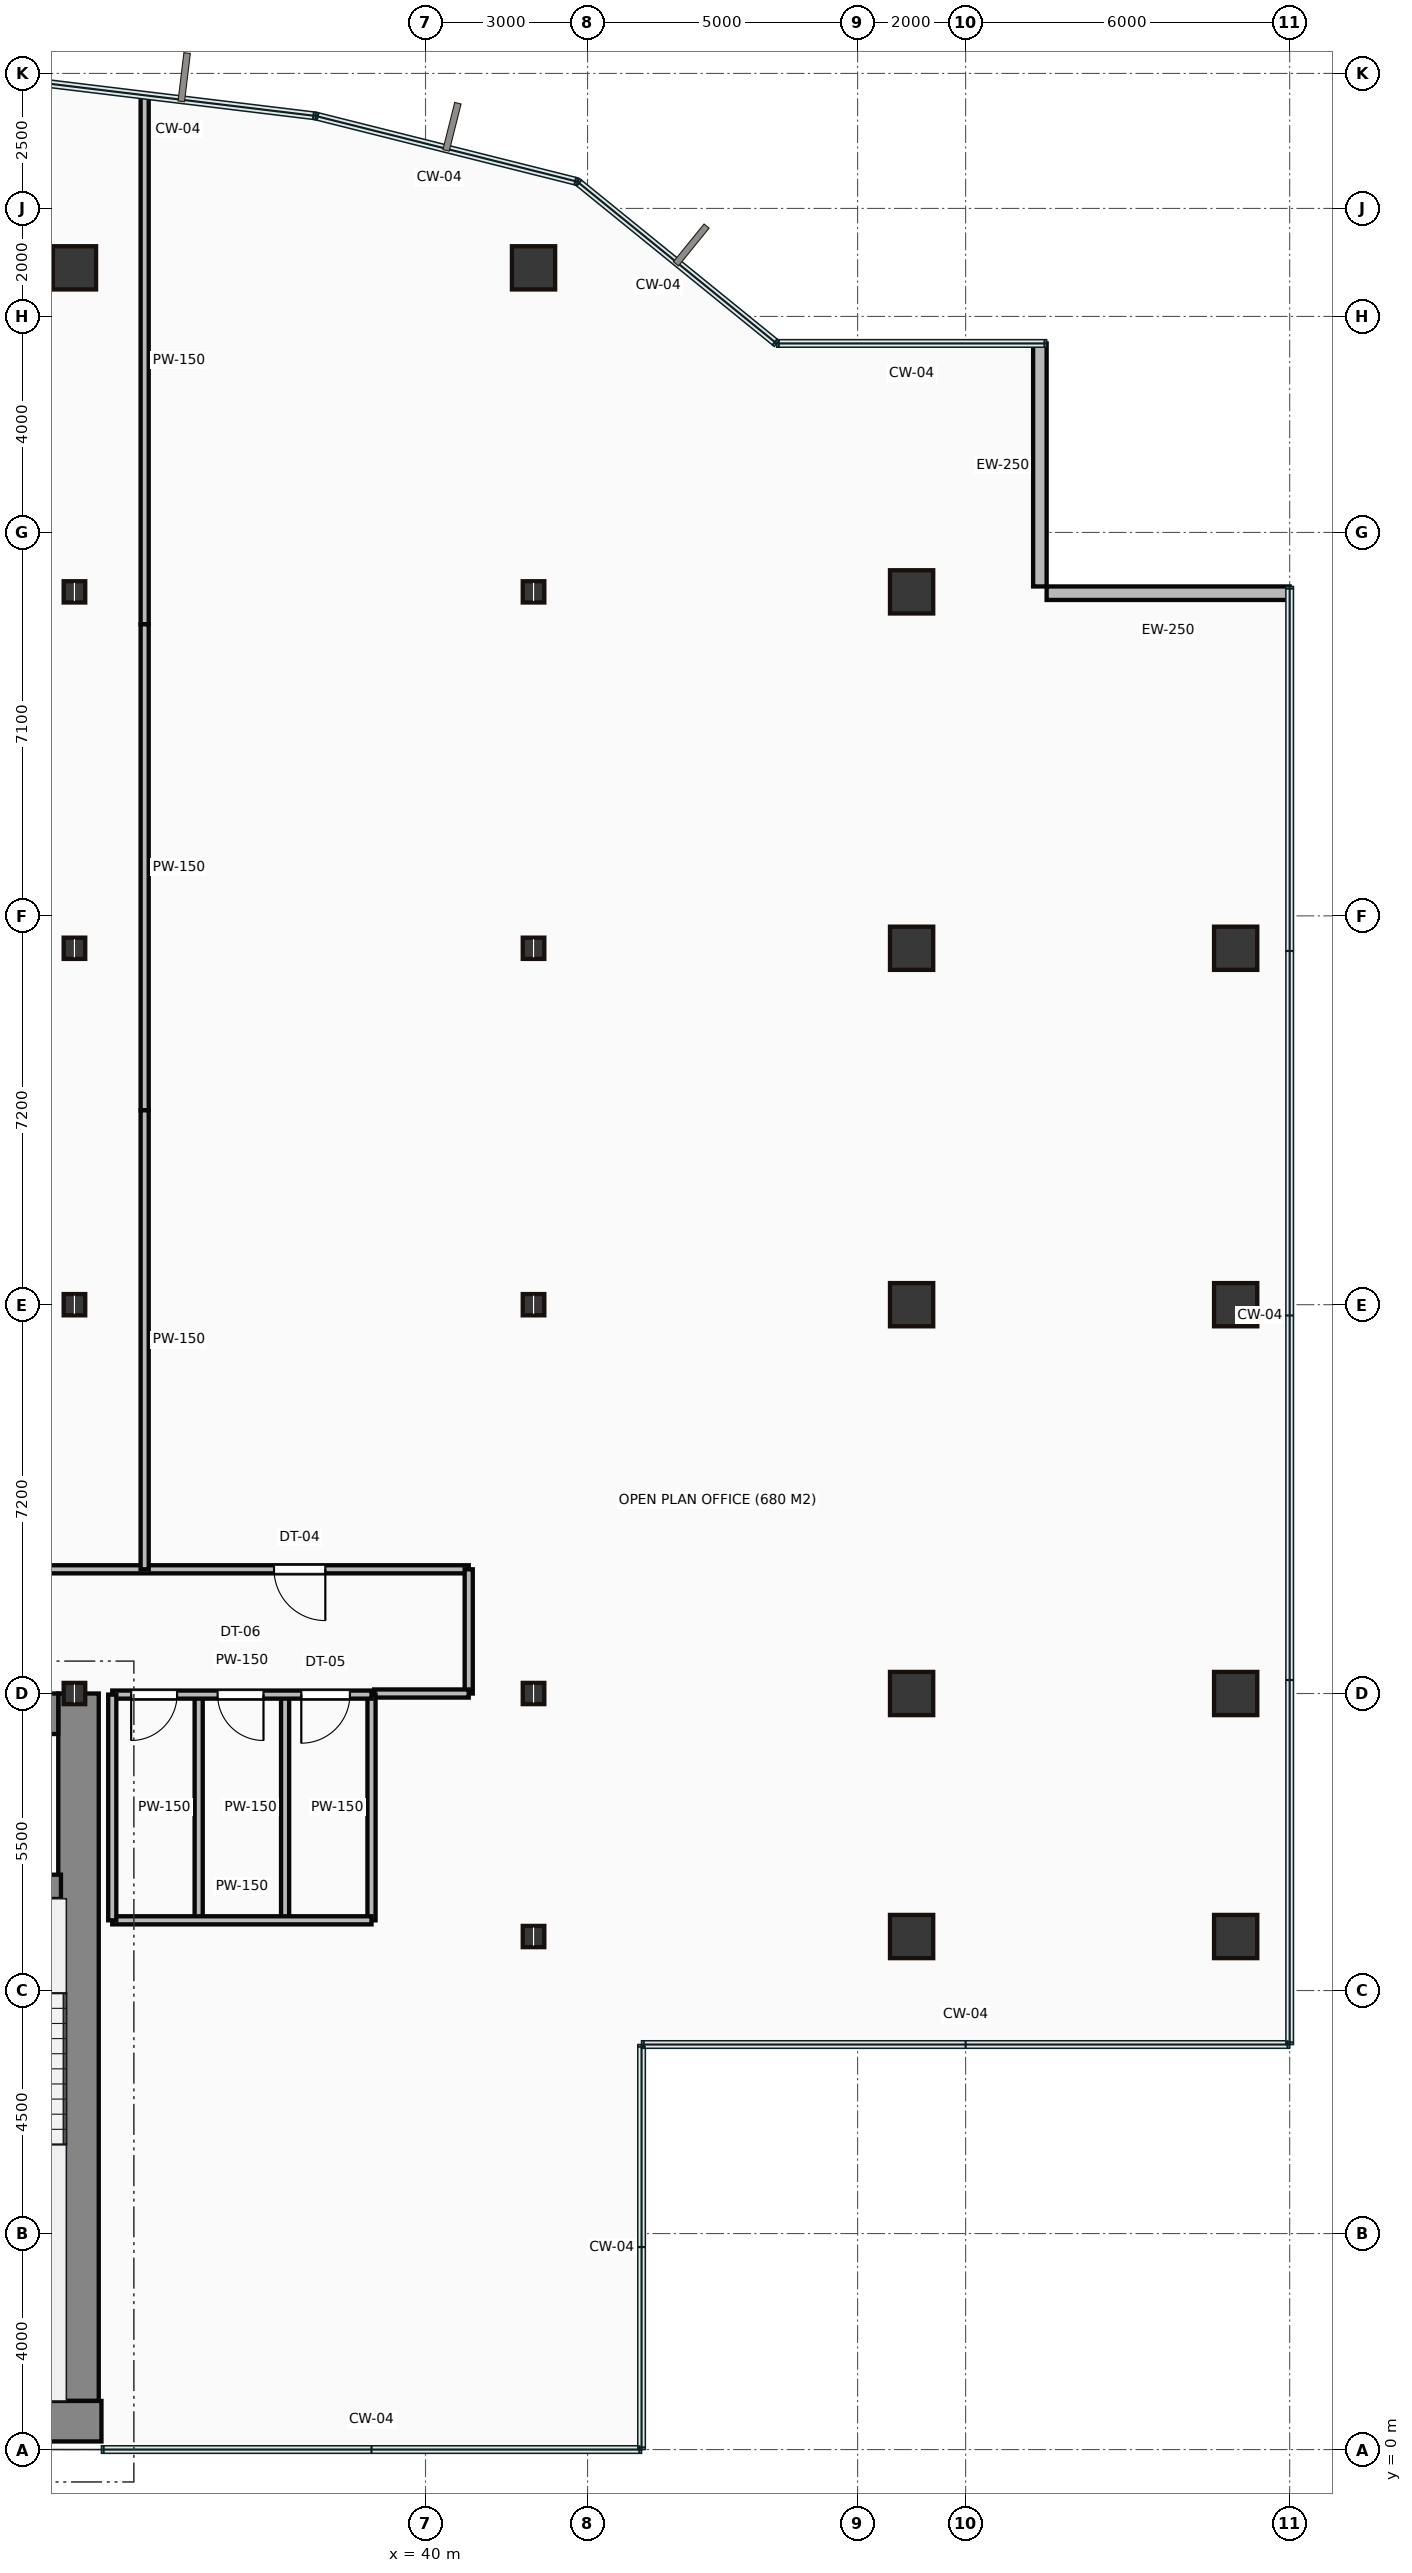
"""IFC4 building model, lengths in metres.
Left out: names, types, materials, properties, quantities, classifications, styles, units other than length and angle.
Written with IfcOpenShell. Run it as: python <this file> out.ifc"""

import sys

from ifc_helpers import new_model, si_unit, direction, frame, frame_2d, origin, origin_2d, place, context, subcontext, project, spatial, rectangle, hollow_rectangle, i_section, extrude, source, transform, mapped, element, fill, save


model = new_model("IFC4")
c1 = context("Model", 3, precision=1e-05, world=origin(), true_north=direction((0.0, 1.0)))
c2 = subcontext(c1, "Body", "Model", "MODEL_VIEW")
j1 = project(units=[si_unit("LENGTHUNIT", "METRE"), si_unit("PLANEANGLEUNIT", "RADIAN")], contexts=[c1])
p1 = place(None, origin())
s1 = spatial("IfcSite", under=j1, at=p1, CompositionType="ELEMENT")
p2 = place(p1, origin())
s2 = spatial("IfcBuilding", under=s1, at=p2, CompositionType="ELEMENT")
p3 = place(p2, frame((0.0, 0.0, 125.15)))
s3 = spatial("IfcBuildingStorey", under=s2, at=p3, CompositionType="ELEMENT", Elevation=125.15)
m1 = source(origin(), c2, "Body", "SweptSolid", [
    extrude(rectangle(XDim=29.5, YDim=0.75, at=frame_2d((14.75, 0.0))), origin(), (0.0, 0.0, 1.0), 3.65),
])
p4 = place(p3, frame((4.5, 0.525, 0.0), z_axis=(0.0, 0.0, 1.0), x_axis=(1.0, 0.0, 0.0)))
e1 = element("IfcWall", 1, at=p4, inside=s3, PredefinedType="SHEAR", context=c2, shape_type="MappedRepresentation", body=[
    mapped(m1, transform((0.0, 0.0, 0.0))),
])
m2 = source(origin(), c2, "Body", "SweptSolid", [
    extrude(rectangle(XDim=13.1, YDim=0.75, at=frame_2d((6.55, 0.0))), origin(), (0.0, 0.0, 1.0), 3.65),
])
p5 = place(p3, frame((33.575, 0.9, 0.0), z_axis=(0.0, 0.0, 1.0), x_axis=(0.0, 1.0, 0.0)))
e2 = element("IfcWall", 2, at=p5, inside=s3, PredefinedType="SHEAR", context=c2, shape_type="MappedRepresentation", body=[
    mapped(m2, transform((0.0, 0.0, 0.0))),
])
m3 = source(origin(), c2, "Body", "SweptSolid", [
    extrude(rectangle(XDim=12.6, YDim=0.75, at=frame_2d((6.3, 0.0))), origin(), (0.0, 0.0, 1.0), 3.65),
])
p6 = place(p3, frame((20.6, 13.625, 0.0), z_axis=(0.0, 0.0, 1.0), x_axis=(1.0, 0.0, 0.0)))
e3 = element("IfcWall", 3, at=p6, inside=s3, PredefinedType="SHEAR", context=c2, shape_type="MappedRepresentation", body=[
    mapped(m3, transform((0.0, 0.0, 0.0))),
])
p7 = place(p6, frame((9.25, 0.0, 0.0)))
e4 = element("IfcOpeningElement", 4, at=p7, cuts=e3, PredefinedType="OPENING", context=c2, shape_type="SweptSolid", body=[
    extrude(rectangle(XDim=1.1, YDim=2.15, at=frame_2d((0.55, 1.075))), frame((0.0, 0.385, 0.0), z_axis=(0.0, -1.0, 0.0), x_axis=(1.0, 0.0, 0.0)), (0.0, 0.0, 1.0), 0.77),
])
m4 = source(origin(), c2, "Body", "SweptSolid", [
    extrude(rectangle(XDim=3.39, YDim=0.45, at=frame_2d((1.695, 0.0))), origin(), (0.0, 0.0, 1.0), 3.65),
])
p8 = place(p3, frame((29.86, 10.42, 0.0), z_axis=(0.0, 0.0, 1.0), x_axis=(1.0, 0.0, 0.0)))
e5 = element("IfcWall", 5, at=p8, inside=s3, PredefinedType="SHEAR", context=c2, shape_type="MappedRepresentation", body=[
    mapped(m4, transform((0.0, 0.0, 0.0))),
])
p9 = place(p8, frame((1.1, 0.0, 0.0)))
e6 = element("IfcOpeningElement", 6, at=p9, cuts=e5, PredefinedType="OPENING", context=c2, shape_type="SweptSolid", body=[
    extrude(rectangle(XDim=1.1, YDim=2.15, at=frame_2d((0.55, 1.075))), frame((0.0, 0.235, 0.0), z_axis=(0.0, -1.0, 0.0), x_axis=(1.0, 0.0, 0.0)), (0.0, 0.0, 1.0), 0.47),
])
m5 = source(origin(), c2, "Body", "SweptSolid", [
    extrude(i_section(OverallWidth=0.399, OverallDepth=0.393, WebThickness=0.023, FlangeThickness=0.037, at=origin_2d()), origin(), (0.0, 0.0, 1.0), 3.65),
])
for number, where, z_axis, x_axis in (
    (7, (33.5, 14.0, 0.0), (0.0, 0.0, 1.0), (1.0, 0.0, 0.0)),
    (8, (33.5, 21.2, 0.0), (0.0, 0.0, 1.0), (1.0, 0.0, 0.0)),
    (9, (33.5, 27.8, 0.0), (0.0, 0.0, 1.0), (1.0, 0.0, 0.0)),
    (10, (33.5, 34.4, 0.0), (0.0, 0.0, 1.0), (1.0, 0.0, 0.0)),
):
    element("IfcColumn", number, at=place(p3, frame(where, z_axis=z_axis, x_axis=x_axis)), inside=s3, PredefinedType="COLUMN", context=c2, shape_type="MappedRepresentation", body=[
        mapped(m5, transform((0.0, 0.0, 0.0))),
    ])
m6 = source(origin(), c2, "Body", "SweptSolid", [
    extrude(hollow_rectangle(XDim=0.8, YDim=0.8, WallThickness=0.04, at=origin_2d()), origin(), (0.0, 0.0, 1.0), 3.65),
])
p10 = place(p3, frame((33.5, 40.4, 0.0), z_axis=(0.0, 0.0, 1.0), x_axis=(1.0, 0.0, 0.0)))
e11 = element("IfcColumn", 11, at=p10, inside=s3, PredefinedType="COLUMN", context=c2, shape_type="MappedRepresentation", body=[
    mapped(m6, transform((0.0, 0.0, 0.0))),
])
for number, where, z_axis, x_axis in (
    (12, (42.0, 9.5, 0.0), (0.0, 0.0, 1.0), (1.0, 0.0, 0.0)),
    (13, (42.0, 14.0, 0.0), (0.0, 0.0, 1.0), (1.0, 0.0, 0.0)),
    (14, (42.0, 21.2, 0.0), (0.0, 0.0, 1.0), (1.0, 0.0, 0.0)),
    (15, (42.0, 27.8, 0.0), (0.0, 0.0, 1.0), (1.0, 0.0, 0.0)),
    (16, (42.0, 34.4, 0.0), (0.0, 0.0, 1.0), (1.0, 0.0, 0.0)),
):
    element("IfcColumn", number, at=place(p3, frame(where, z_axis=z_axis, x_axis=x_axis)), inside=s3, PredefinedType="COLUMN", context=c2, shape_type="MappedRepresentation", body=[
        mapped(m5, transform((0.0, 0.0, 0.0))),
    ])
for number, where, z_axis, x_axis in (
    (17, (42.0, 40.4, 0.0), (0.0, 0.0, 1.0), (1.0, 0.0, 0.0)),
    (18, (49.0, 9.5, 0.0), (0.0, 0.0, 1.0), (1.0, 0.0, 0.0)),
    (19, (49.0, 14.0, 0.0), (0.0, 0.0, 1.0), (1.0, 0.0, 0.0)),
    (20, (49.0, 21.2, 0.0), (0.0, 0.0, 1.0), (1.0, 0.0, 0.0)),
    (21, (49.0, 27.8, 0.0), (0.0, 0.0, 1.0), (1.0, 0.0, 0.0)),
    (22, (49.0, 34.4, 0.0), (0.0, 0.0, 1.0), (1.0, 0.0, 0.0)),
    (23, (55.0, 9.5, 0.0), (0.0, 0.0, 1.0), (1.0, 0.0, 0.0)),
    (24, (55.0, 14.0, 0.0), (0.0, 0.0, 1.0), (1.0, 0.0, 0.0)),
    (25, (55.0, 21.2, 0.0), (0.0, 0.0, 1.0), (1.0, 0.0, 0.0)),
    (26, (55.0, 27.8, 0.0), (0.0, 0.0, 1.0), (1.0, 0.0, 0.0)),
):
    element("IfcColumn", number, at=place(p3, frame(where, z_axis=z_axis, x_axis=x_axis)), inside=s3, PredefinedType="COLUMN", context=c2, shape_type="MappedRepresentation", body=[
        mapped(m6, transform((0.0, 0.0, 0.0))),
    ])
m7 = source(origin(), c2, "Body", "SweptSolid", [
    extrude(rectangle(XDim=4.5, YDim=0.25, at=frame_2d((2.25, 0.0))), origin(), (0.0, 0.0, 1.0), 3.4),
])
for number, where, z_axis, x_axis in (
    (27, (56.0, 34.375, 0.0), (0.0, 0.0, 1.0), (-1.0, 0.0, 0.0)),
    (28, (51.375, 34.5, 0.0), (0.0, 0.0, 1.0), (0.0, 1.0, 0.0)),
):
    element("IfcWall", number, at=place(p3, frame(where, z_axis=z_axis, x_axis=x_axis)), inside=s3, PredefinedType="STANDARD", context=c2, shape_type="MappedRepresentation", body=[
        mapped(m7, transform((0.0, 0.0, 0.0))),
    ])
m8 = source(origin(), c2, "Body", "SweptSolid", [
    extrude(rectangle(XDim=4.8, YDim=0.15, at=frame_2d((2.4, 0.0))), origin(), (0.0, 0.0, 1.0), 2.702),
])
p11 = place(p3, frame((34.2, 13.98, 0.0), z_axis=(0.0, 0.0, 1.0), x_axis=(1.0, 0.0, 0.0)))
e29 = element("IfcWall", 29, at=p11, inside=s3, PredefinedType="PARTITIONING", context=c2, shape_type="MappedRepresentation", body=[
    mapped(m8, transform((0.0, 0.0, 0.0))),
])
p12 = place(p11, frame((0.35, 0.0, 0.0)))
e30 = element("IfcOpeningElement", 30, at=p12, cuts=e29, PredefinedType="OPENING", context=c2, shape_type="SweptSolid", body=[
    extrude(rectangle(XDim=0.85, YDim=2.1, at=frame_2d((0.425, 1.05))), frame((0.0, 0.085, 0.0), z_axis=(0.0, -1.0, 0.0), x_axis=(1.0, 0.0, 0.0)), (0.0, 0.0, 1.0), 0.17),
])
p13 = place(p11, frame((1.95, 0.0, 0.0)))
e31 = element("IfcOpeningElement", 31, at=p13, cuts=e29, PredefinedType="OPENING", context=c2, shape_type="SweptSolid", body=[
    extrude(rectangle(XDim=0.85, YDim=2.1, at=frame_2d((0.425, 1.05))), frame((0.0, 0.085, 0.0), z_axis=(0.0, -1.0, 0.0), x_axis=(1.0, 0.0, 0.0)), (0.0, 0.0, 1.0), 0.17),
])
p14 = place(p11, frame((3.5, 0.0, 0.0)))
e32 = element("IfcOpeningElement", 32, at=p14, cuts=e29, PredefinedType="OPENING", context=c2, shape_type="SweptSolid", body=[
    extrude(rectangle(XDim=0.9, YDim=2.1, at=frame_2d((0.45, 1.05))), frame((0.0, 0.085, 0.0), z_axis=(0.0, -1.0, 0.0), x_axis=(1.0, 0.0, 0.0)), (0.0, 0.0, 1.0), 0.17),
])
m9 = source(origin(), c2, "Body", "SweptSolid", [
    extrude(rectangle(XDim=4.8, YDim=0.15, at=frame_2d((2.4, 0.0))), origin(), (0.0, 0.0, 1.0), 3.4),
])
p15 = place(p3, frame((34.2, 9.8, 0.0), z_axis=(0.0, 0.0, 1.0), x_axis=(1.0, 0.0, 0.0)))
e33 = element("IfcWall", 33, at=p15, inside=s3, PredefinedType="PARTITIONING", context=c2, shape_type="MappedRepresentation", body=[
    mapped(m9, transform((0.0, 0.0, 0.0))),
])
m10 = source(origin(), c2, "Body", "SweptSolid", [
    extrude(rectangle(XDim=4.18, YDim=0.15, at=frame_2d((2.09, 0.0))), origin(), (0.0, 0.0, 1.0), 3.4),
])
for number, where, z_axis, x_axis in (
    (34, (39.0, 9.8, 0.0), (0.0, 0.0, 1.0), (0.0, 1.0, 0.0)),
    (35, (34.2, 9.8, 0.0), (0.0, 0.0, 1.0), (0.0, 1.0, 0.0)),
    (36, (35.8, 9.8, 0.0), (0.0, 0.0, 1.0), (0.0, 1.0, 0.0)),
    (37, (37.4, 9.8, 0.0), (0.0, 0.0, 1.0), (0.0, 1.0, 0.0)),
):
    element("IfcWall", number, at=place(p3, frame(where, z_axis=z_axis, x_axis=x_axis)), inside=s3, PredefinedType="PARTITIONING", context=c2, shape_type="MappedRepresentation", body=[
        mapped(m10, transform((0.0, 0.0, 0.0))),
    ])
m11 = source(origin(), c2, "Body", "SweptSolid", [
    extrude(rectangle(XDim=28.75, YDim=0.15, at=frame_2d((14.375, 0.0))), origin(), (0.0, 0.0, 1.0), 3.4),
])
p16 = place(p3, frame((12.05, 16.3, 0.0), z_axis=(0.0, 0.0, 1.0), x_axis=(1.0, 0.0, 0.0)))
e38 = element("IfcWall", 38, at=p16, inside=s3, PredefinedType="PARTITIONING", context=c2, shape_type="MappedRepresentation", body=[
    mapped(m11, transform((0.0, 0.0, 0.0))),
])
p17 = place(p16, frame((5.43, 0.0, 0.0)))
e39 = element("IfcOpeningElement", 39, at=p17, cuts=e38, PredefinedType="OPENING", context=c2, shape_type="SweptSolid", body=[
    extrude(rectangle(XDim=0.95, YDim=2.15, at=frame_2d((0.475, 1.075))), frame((0.0, 0.085, 0.0), z_axis=(0.0, -1.0, 0.0), x_axis=(1.0, 0.0, 0.0)), (0.0, 0.0, 1.0), 0.17),
])
p18 = place(p16, frame((16.675, 0.0, 0.0)))
e40 = element("IfcOpeningElement", 40, at=p18, cuts=e38, PredefinedType="OPENING", context=c2, shape_type="SweptSolid", body=[
    extrude(rectangle(XDim=0.95, YDim=2.15, at=frame_2d((0.475, 1.075))), frame((0.0, 0.085, 0.0), z_axis=(0.0, -1.0, 0.0), x_axis=(1.0, 0.0, 0.0)), (0.0, 0.0, 1.0), 0.17),
])
p19 = place(p16, frame((25.145, 0.0, 0.0)))
e41 = element("IfcOpeningElement", 41, at=p19, cuts=e38, PredefinedType="OPENING", context=c2, shape_type="SweptSolid", body=[
    extrude(rectangle(XDim=0.95, YDim=2.15, at=frame_2d((0.475, 1.075))), frame((0.0, 0.085, 0.0), z_axis=(0.0, -1.0, 0.0), x_axis=(1.0, 0.0, 0.0)), (0.0, 0.0, 1.0), 0.17),
])
m12 = source(origin(), c2, "Body", "SweptSolid", [
    extrude(rectangle(XDim=2.3, YDim=0.15, at=frame_2d((1.15, 0.0))), origin(), (0.0, 0.0, 1.0), 3.4),
])
p20 = place(p3, frame((40.8, 16.3, 0.0), z_axis=(0.0, 0.0, 1.0), x_axis=(0.0, -1.0, 0.0)))
e42 = element("IfcWall", 42, at=p20, inside=s3, PredefinedType="PARTITIONING", context=c2, shape_type="MappedRepresentation", body=[
    mapped(m12, transform((0.0, 0.0, 0.0))),
])
m13 = source(origin(), c2, "Body", "SweptSolid", [
    extrude(rectangle(XDim=1.75, YDim=0.15, at=frame_2d((0.875, 0.0))), origin(), (0.0, 0.0, 1.0), 2.702),
])
p21 = place(p3, frame((40.8, 14.0, 0.0), z_axis=(0.0, 0.0, 1.0), x_axis=(-1.0, 0.0, 0.0)))
e43 = element("IfcWall", 43, at=p21, inside=s3, PredefinedType="PARTITIONING", context=c2, shape_type="MappedRepresentation", body=[
    mapped(m13, transform((0.0, 0.0, 0.0))),
])
m14 = source(origin(), c2, "Body", "SweptSolid", [
    extrude(rectangle(XDim=9.776, YDim=0.15, at=frame_2d((4.888, 0.0))), origin(), (0.0, 0.0, 1.0), 3.4),
])
p22 = place(p3, frame((34.8, 43.576, 0.0), z_axis=(0.0, 0.0, 1.0), x_axis=(0.0, -1.0, 0.0)))
e44 = element("IfcWall", 44, at=p22, inside=s3, PredefinedType="PARTITIONING", context=c2, shape_type="MappedRepresentation", body=[
    mapped(m14, transform((0.0, 0.0, 0.0))),
])
m15 = source(origin(), c2, "Body", "SweptSolid", [
    extrude(rectangle(XDim=9.0, YDim=0.15, at=frame_2d((4.5, 0.0))), origin(), (0.0, 0.0, 1.0), 3.4),
])
p23 = place(p3, frame((34.8, 33.8, 0.0), z_axis=(0.0, 0.0, 1.0), x_axis=(0.0, -1.0, 0.0)))
e45 = element("IfcWall", 45, at=p23, inside=s3, PredefinedType="PARTITIONING", context=c2, shape_type="MappedRepresentation", body=[
    mapped(m15, transform((0.0, 0.0, 0.0))),
])
m16 = source(origin(), c2, "Body", "SweptSolid", [
    extrude(rectangle(XDim=8.5, YDim=0.15, at=frame_2d((4.25, 0.0))), origin(), (0.0, 0.0, 1.0), 3.4),
])
p24 = place(p3, frame((34.8, 24.8, 0.0), z_axis=(0.0, 0.0, 1.0), x_axis=(0.0, -1.0, 0.0)))
e46 = element("IfcWall", 46, at=p24, inside=s3, PredefinedType="PARTITIONING", context=c2, shape_type="MappedRepresentation", body=[
    mapped(m16, transform((0.0, 0.0, 0.0))),
])
m17 = source(origin(), c2, "Body", "SweptSolid", [
    extrude(rectangle(XDim=0.85, YDim=2.1, at=frame_2d((0.425, 1.05))), frame((0.0, 0.025, 0.0), z_axis=(0.0, -1.0, 0.0), x_axis=(1.0, 0.0, 0.0)), (0.0, 0.0, 1.0), 0.05),
])
p25 = place(p12, frame((0.85, 0.0, 0.0), z_axis=(0.0, 0.0, 1.0), x_axis=(-1.0, 0.0, 0.0)))
e47 = element("IfcDoor", 47, at=p25, inside=s3, OperationType="SINGLE_SWING_LEFT", PredefinedType="DOOR", context=c2, shape_type="MappedRepresentation", body=[
    mapped(m17, transform((0.0, 0.0, 0.0))),
])
fill(e30, e47)
p26 = place(p13, frame((0.85, 0.0, 0.0), z_axis=(0.0, 0.0, 1.0), x_axis=(-1.0, 0.0, 0.0)))
e48 = element("IfcDoor", 48, at=p26, inside=s3, OperationType="SINGLE_SWING_RIGHT", PredefinedType="DOOR", context=c2, shape_type="MappedRepresentation", body=[
    mapped(m17, transform((0.0, 0.0, 0.0))),
])
fill(e31, e48)
m18 = source(origin(), c2, "Body", "SweptSolid", [
    extrude(rectangle(XDim=0.9, YDim=2.1, at=frame_2d((0.45, 1.05))), frame((0.0, 0.025, 0.0), z_axis=(0.0, -1.0, 0.0), x_axis=(1.0, 0.0, 0.0)), (0.0, 0.0, 1.0), 0.05),
])
p27 = place(p14, frame((0.9, 0.0, 0.0), z_axis=(0.0, 0.0, 1.0), x_axis=(-1.0, 0.0, 0.0)))
e49 = element("IfcDoor", 49, at=p27, inside=s3, OperationType="SINGLE_SWING_LEFT", PredefinedType="DOOR", context=c2, shape_type="MappedRepresentation", body=[
    mapped(m18, transform((0.0, 0.0, 0.0))),
])
fill(e32, e49)
m19 = source(origin(), c2, "Body", "SweptSolid", [
    extrude(rectangle(XDim=0.95, YDim=2.15, at=frame_2d((0.475, 1.075))), frame((0.0, 0.025, 0.0), z_axis=(0.0, -1.0, 0.0), x_axis=(1.0, 0.0, 0.0)), (0.0, 0.0, 1.0), 0.05),
])
p28 = place(p19, origin())
e50 = element("IfcDoor", 50, at=p28, inside=s3, OperationType="SINGLE_SWING_RIGHT", PredefinedType="DOOR", context=c2, shape_type="MappedRepresentation", body=[
    mapped(m19, transform((0.0, 0.0, 0.0))),
])
fill(e41, e50)
save(model, sys.argv[1])
